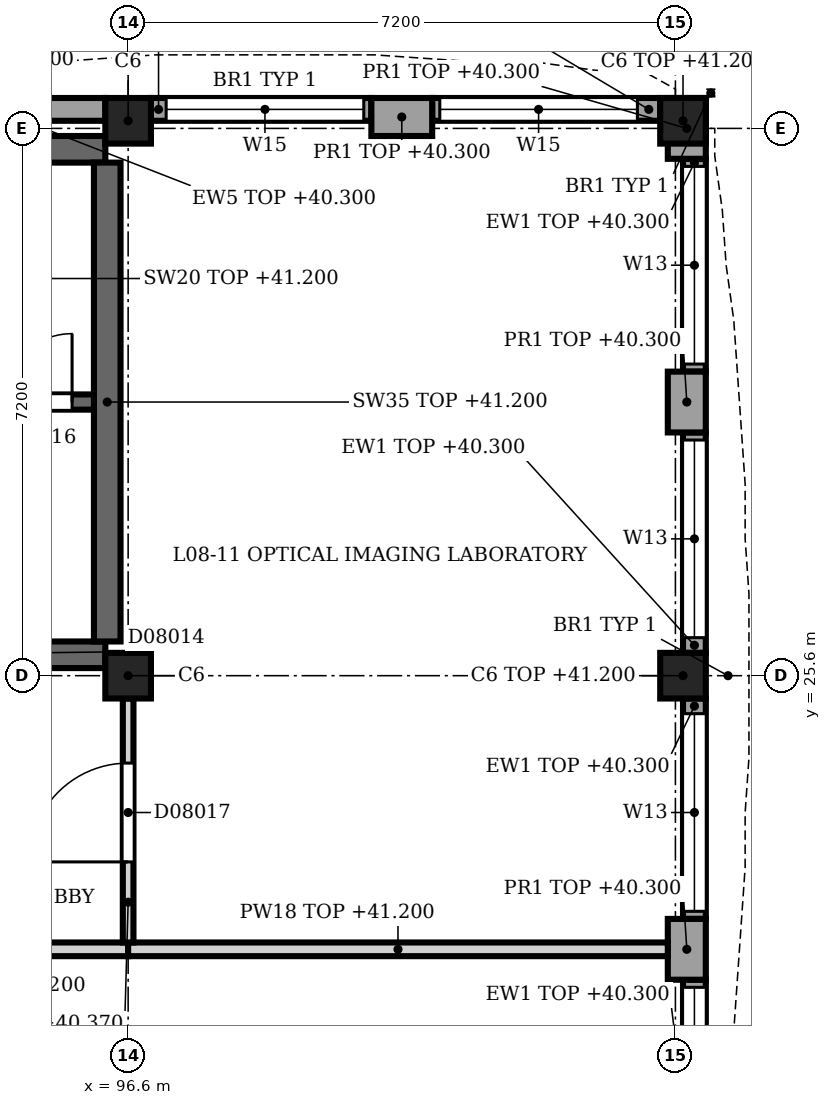
"""IFC4 building model, lengths in metres.
Left out: names, types, materials, properties, quantities, classifications, styles, units other than length and angle.
Written with IfcOpenShell. Run it as: python <this file> out.ifc"""

import sys

from ifc_helpers import new_model, si_unit, direction, frame, frame_2d, origin, origin_2d, place, context, subcontext, project, spatial, rectangle, extrude, element, fill, save


model = new_model("IFC4")
c1 = context("Model", 3, precision=1e-05, world=origin(), true_north=direction((0.0, 1.0)))
c2 = subcontext(c1, "Body", "Model", "MODEL_VIEW")
j1 = project(units=[si_unit("LENGTHUNIT", "METRE"), si_unit("PLANEANGLEUNIT", "RADIAN")], contexts=[c1])
p1 = place(None, origin())
s1 = spatial("IfcSite", under=j1, at=p1, CompositionType="ELEMENT")
p2 = place(p1, origin())
s2 = spatial("IfcBuilding", under=s1, at=p2, CompositionType="ELEMENT")
p3 = place(p2, frame((0.0, 0.0, 36.9)))
s3 = spatial("IfcBuildingStorey", under=s2, at=p3, CompositionType="ELEMENT", Elevation=36.9)
for number, where, z_axis, x_axis in (
    (1, (96.6, 25.6, 0.0), (0.0, 0.0, 1.0), (1.0, 0.0, 0.0)),
    (2, (96.6, 32.9, 0.0), (0.0, 0.0, 1.0), (1.0, 0.0, 0.0)),
):
    element("IfcColumn", number, at=place(p3, frame(where, z_axis=z_axis, x_axis=x_axis)), inside=s3, PredefinedType="COLUMN", context=c2, shape_type="SweptSolid", body=[
        extrude(rectangle(XDim=0.6, YDim=0.6, at=origin_2d()), origin(), (0.0, 0.0, 1.0), 4.5),
    ])
for number, where, z_axis, x_axis in (
    (3, (103.9, 25.6, 0.0), (0.0, 0.0, 1.0), (1.0, 0.0, 0.0)),
    (4, (103.9, 32.9, 0.0), (0.0, 0.0, 1.0), (1.0, 0.0, 0.0)),
):
    element("IfcColumn", number, at=place(p3, frame(where, z_axis=z_axis, x_axis=x_axis)), inside=s3, PredefinedType="COLUMN", context=c2, shape_type="SweptSolid", body=[
        extrude(rectangle(XDim=0.6, YDim=0.6, at=origin_2d()), origin(), (0.0, 0.0, 1.0), 4.3),
    ])
p4 = place(p3, frame((99.8, 32.95, 0.0), z_axis=(0.0, 0.0, 1.0), x_axis=(1.0, 0.0, 0.0)))
e5 = element("IfcWall", 5, at=p4, inside=s3, PredefinedType="SOLIDWALL", context=c2, shape_type="SweptSolid", body=[
    extrude(rectangle(XDim=0.8, YDim=0.5, at=frame_2d((0.4, 0.0))), origin(), (0.0, 0.0, 1.0), 3.4),
])
p5 = place(p3, frame((93.4, 33.05, 0.0), z_axis=(0.0, 0.0, 1.0), x_axis=(1.0, 0.0, 0.0)))
e6 = element("IfcWall", 6, at=p5, inside=s3, PredefinedType="SOLIDWALL", context=c2, shape_type="SweptSolid", body=[
    extrude(rectangle(XDim=2.9, YDim=0.3, at=frame_2d((1.45, 0.0))), origin(), (0.0, 0.0, 1.0), 3.4),
])
p6 = place(p3, frame((96.9, 33.05, 0.0), z_axis=(0.0, 0.0, 1.0), x_axis=(1.0, 0.0, 0.0)))
e7 = element("IfcWall", 7, at=p6, inside=s3, PredefinedType="SOLIDWALL", context=c2, shape_type="SweptSolid", body=[
    extrude(rectangle(XDim=2.9, YDim=0.3, at=frame_2d((1.45, 0.0))), origin(), (0.0, 0.0, 1.0), 3.4),
])
p7 = place(p6, frame((0.2, 0.0, 1.0)))
e8 = element("IfcOpeningElement", 8, at=p7, cuts=e7, PredefinedType="OPENING", context=c2, shape_type="SweptSolid", body=[
    extrude(rectangle(XDim=2.6, YDim=2.0, at=frame_2d((1.3, 1.0))), frame((0.0, 0.16, 0.0), z_axis=(0.0, -1.0, 0.0), x_axis=(1.0, 0.0, 0.0)), (0.0, 0.0, 1.0), 0.32),
])
p8 = place(p3, frame((100.6, 33.05, 0.0), z_axis=(0.0, 0.0, 1.0), x_axis=(1.0, 0.0, 0.0)))
e9 = element("IfcWall", 9, at=p8, inside=s3, PredefinedType="SOLIDWALL", context=c2, shape_type="SweptSolid", body=[
    extrude(rectangle(XDim=3.0, YDim=0.3, at=frame_2d((1.5, 0.0))), origin(), (0.0, 0.0, 1.0), 3.4),
])
p9 = place(p8, frame((0.1, 0.0, 1.0)))
e10 = element("IfcOpeningElement", 10, at=p9, cuts=e9, PredefinedType="OPENING", context=c2, shape_type="SweptSolid", body=[
    extrude(rectangle(XDim=2.6, YDim=2.0, at=frame_2d((1.3, 1.0))), frame((0.0, 0.16, 0.0), z_axis=(0.0, -1.0, 0.0), x_axis=(1.0, 0.0, 0.0)), (0.0, 0.0, 1.0), 0.32),
])
for number, where, z_axis, x_axis in (
    (11, (103.95, 33.2, 0.0), (0.0, 0.0, 1.0), (0.0, -1.0, 0.0)),
    (12, (103.95, 29.6, 0.0), (0.0, 0.0, 1.0), (0.0, -1.0, 0.0)),
):
    element("IfcWall", number, at=place(p3, frame(where, z_axis=z_axis, x_axis=x_axis)), inside=s3, PredefinedType="SOLIDWALL", context=c2, shape_type="SweptSolid", body=[
        extrude(rectangle(XDim=0.8, YDim=0.5, at=frame_2d((0.4, 0.0))), origin(), (0.0, 0.0, 1.0), 3.4),
    ])
p10 = place(p3, frame((103.95, 22.4, 0.0), z_axis=(0.0, 0.0, 1.0), x_axis=(0.0, -1.0, 0.0)))
e13 = element("IfcWall", 13, at=p10, inside=s3, PredefinedType="SOLIDWALL", context=c2, shape_type="SweptSolid", body=[
    extrude(rectangle(XDim=0.8, YDim=0.5, at=frame_2d((0.4, 0.0))), origin(), (0.0, 0.0, 1.0), 3.4),
])
p11 = place(p3, frame((104.05, 32.4, 0.0), z_axis=(0.0, 0.0, 1.0), x_axis=(0.0, -1.0, 0.0)))
e14 = element("IfcWall", 14, at=p11, inside=s3, PredefinedType="SOLIDWALL", context=c2, shape_type="SweptSolid", body=[
    extrude(rectangle(XDim=2.8, YDim=0.3, at=frame_2d((1.4, 0.0))), origin(), (0.0, 0.0, 1.0), 3.4),
])
p12 = place(p11, frame((0.1, 0.0, 0.9)))
e15 = element("IfcOpeningElement", 15, at=p12, cuts=e14, PredefinedType="OPENING", context=c2, shape_type="SweptSolid", body=[
    extrude(rectangle(XDim=2.6, YDim=2.2, at=frame_2d((1.3, 1.1))), frame((0.0, 0.16, 0.0), z_axis=(0.0, -1.0, 0.0), x_axis=(1.0, 0.0, 0.0)), (0.0, 0.0, 1.0), 0.32),
])
p13 = place(p3, frame((104.05, 28.8, 0.0), z_axis=(0.0, 0.0, 1.0), x_axis=(0.0, -1.0, 0.0)))
e16 = element("IfcWall", 16, at=p13, inside=s3, PredefinedType="SOLIDWALL", context=c2, shape_type="SweptSolid", body=[
    extrude(rectangle(XDim=2.9, YDim=0.3, at=frame_2d((1.45, 0.0))), origin(), (0.0, 0.0, 1.0), 3.4),
])
p14 = place(p13, frame((0.1, 0.0, 0.9)))
e17 = element("IfcOpeningElement", 17, at=p14, cuts=e16, PredefinedType="OPENING", context=c2, shape_type="SweptSolid", body=[
    extrude(rectangle(XDim=2.6, YDim=2.2, at=frame_2d((1.3, 1.1))), frame((0.0, 0.16, 0.0), z_axis=(0.0, -1.0, 0.0), x_axis=(1.0, 0.0, 0.0)), (0.0, 0.0, 1.0), 0.32),
])
p15 = place(p3, frame((104.05, 25.3, 0.0), z_axis=(0.0, 0.0, 1.0), x_axis=(0.0, -1.0, 0.0)))
e18 = element("IfcWall", 18, at=p15, inside=s3, PredefinedType="SOLIDWALL", context=c2, shape_type="SweptSolid", body=[
    extrude(rectangle(XDim=2.9, YDim=0.3, at=frame_2d((1.45, 0.0))), origin(), (0.0, 0.0, 1.0), 3.4),
])
p16 = place(p15, frame((0.2, 0.0, 0.9)))
e19 = element("IfcOpeningElement", 19, at=p16, cuts=e18, PredefinedType="OPENING", context=c2, shape_type="SweptSolid", body=[
    extrude(rectangle(XDim=2.6, YDim=2.2, at=frame_2d((1.3, 1.1))), frame((0.0, 0.16, 0.0), z_axis=(0.0, -1.0, 0.0), x_axis=(1.0, 0.0, 0.0)), (0.0, 0.0, 1.0), 0.32),
])
p17 = place(p3, frame((104.05, 21.6, 0.0), z_axis=(0.0, 0.0, 1.0), x_axis=(0.0, -1.0, 0.0)))
e20 = element("IfcWall", 20, at=p17, inside=s3, PredefinedType="SOLIDWALL", context=c2, shape_type="SweptSolid", body=[
    extrude(rectangle(XDim=2.9, YDim=0.3, at=frame_2d((1.45, 0.0))), origin(), (0.0, 0.0, 1.0), 3.4),
])
p18 = place(p17, frame((0.1, 0.0, 0.9)))
e21 = element("IfcOpeningElement", 21, at=p18, cuts=e20, PredefinedType="OPENING", context=c2, shape_type="SweptSolid", body=[
    extrude(rectangle(XDim=2.6, YDim=2.2, at=frame_2d((1.3, 1.1))), frame((0.0, 0.16, 0.0), z_axis=(0.0, -1.0, 0.0), x_axis=(1.0, 0.0, 0.0)), (0.0, 0.0, 1.0), 0.32),
])
p19 = place(p3, frame((89.7, 25.875, 0.0), z_axis=(0.0, 0.0, 1.0), x_axis=(1.0, 0.0, 0.0)))
e22 = element("IfcWall", 22, at=p19, inside=s3, PredefinedType="SHEAR", context=c2, shape_type="SweptSolid", body=[
    extrude(rectangle(XDim=6.6, YDim=0.35, at=frame_2d((3.3, 0.0))), origin(), (0.0, 0.0, 1.0), 4.3),
])
p20 = place(p19, frame((2.7, 0.0, 0.0)))
e23 = element("IfcOpeningElement", 23, at=p20, cuts=e22, PredefinedType="OPENING", context=c2, shape_type="SweptSolid", body=[
    extrude(rectangle(XDim=1.8, YDim=2.1, at=frame_2d((0.9, 1.05))), frame((0.0, 0.185, 0.0), z_axis=(0.0, -1.0, 0.0), x_axis=(1.0, 0.0, 0.0)), (0.0, 0.0, 1.0), 0.37),
])
p21 = place(p3, frame((89.7, 32.525, 0.0), z_axis=(0.0, 0.0, 1.0), x_axis=(1.0, 0.0, 0.0)))
e24 = element("IfcWall", 24, at=p21, inside=s3, PredefinedType="SHEAR", context=c2, shape_type="SweptSolid", body=[
    extrude(rectangle(XDim=6.6, YDim=0.35, at=frame_2d((3.3, 0.0))), origin(), (0.0, 0.0, 1.0), 4.3),
])
p22 = place(p3, frame((96.325, 26.05, 0.0), z_axis=(0.0, 0.0, 1.0), x_axis=(0.0, 1.0, 0.0)))
e25 = element("IfcWall", 25, at=p22, inside=s3, PredefinedType="SHEAR", context=c2, shape_type="SweptSolid", body=[
    extrude(rectangle(XDim=6.3, YDim=0.35, at=frame_2d((3.15, 0.0))), origin(), (0.0, 0.0, 1.0), 4.3),
])
p23 = place(p3, frame((96.15, 29.2, 0.0), z_axis=(0.0, 0.0, 1.0), x_axis=(-1.0, 0.0, 0.0)))
e26 = element("IfcWall", 26, at=p23, inside=s3, PredefinedType="SHEAR", context=c2, shape_type="SweptSolid", body=[
    extrude(rectangle(XDim=10.35, YDim=0.2, at=frame_2d((5.175, 0.0))), origin(), (0.0, 0.0, 1.0), 4.3),
])
p24 = place(p23, frame((8.8, 0.0, 0.0)))
e27 = element("IfcOpeningElement", 27, at=p24, cuts=e26, PredefinedType="OPENING", context=c2, shape_type="SweptSolid", body=[
    extrude(rectangle(XDim=1.1, YDim=2.1, at=frame_2d((0.55, 1.05))), frame((0.0, 0.11, 0.0), z_axis=(0.0, -1.0, 0.0), x_axis=(1.0, 0.0, 0.0)), (0.0, 0.0, 1.0), 0.22),
])
p25 = place(p23, frame((6.6, 0.0, 0.0)))
e28 = element("IfcOpeningElement", 28, at=p25, cuts=e26, PredefinedType="OPENING", context=c2, shape_type="SweptSolid", body=[
    extrude(rectangle(XDim=1.1, YDim=2.1, at=frame_2d((0.55, 1.05))), frame((0.0, 0.11, 0.0), z_axis=(0.0, -1.0, 0.0), x_axis=(1.0, 0.0, 0.0)), (0.0, 0.0, 1.0), 0.22),
])
p26 = place(p23, frame((3.75, 0.0, 0.0)))
e29 = element("IfcOpeningElement", 29, at=p26, cuts=e26, PredefinedType="OPENING", context=c2, shape_type="SweptSolid", body=[
    extrude(rectangle(XDim=1.4, YDim=2.1, at=frame_2d((0.7, 1.05))), frame((0.0, 0.11, 0.0), z_axis=(0.0, -1.0, 0.0), x_axis=(1.0, 0.0, 0.0)), (0.0, 0.0, 1.0), 0.22),
])
p27 = place(p23, frame((1.962, 0.0, 0.0)))
e30 = element("IfcOpeningElement", 30, at=p27, cuts=e26, PredefinedType="OPENING", context=c2, shape_type="SweptSolid", body=[
    extrude(rectangle(XDim=0.9, YDim=2.1, at=frame_2d((0.45, 1.05))), frame((0.0, 0.11, 0.0), z_axis=(0.0, -1.0, 0.0), x_axis=(1.0, 0.0, 0.0)), (0.0, 0.0, 1.0), 0.22),
])
p28 = place(p23, frame((0.288, 0.0, 0.0)))
e31 = element("IfcOpeningElement", 31, at=p28, cuts=e26, PredefinedType="OPENING", context=c2, shape_type="SweptSolid", body=[
    extrude(rectangle(XDim=0.9, YDim=2.1, at=frame_2d((0.45, 1.05))), frame((0.0, 0.11, 0.0), z_axis=(0.0, -1.0, 0.0), x_axis=(1.0, 0.0, 0.0)), (0.0, 0.0, 1.0), 0.22),
])
p29 = place(p3, frame((92.91, 22.0, 0.0), z_axis=(0.0, 0.0, 1.0), x_axis=(1.0, 0.0, 0.0)))
e32 = element("IfcWall", 32, at=p29, inside=s3, PredefinedType="PARTITIONING", context=c2, shape_type="SweptSolid", body=[
    extrude(rectangle(XDim=3.69, YDim=0.18, at=frame_2d((1.845, 0.0))), origin(), (0.0, 0.0, 1.0), 4.3),
])
p30 = place(p3, frame((96.6, 22.0, 0.0), z_axis=(0.0, 0.0, 1.0), x_axis=(1.0, 0.0, 0.0)))
e33 = element("IfcWall", 33, at=p30, inside=s3, PredefinedType="PARTITIONING", context=c2, shape_type="SweptSolid", body=[
    extrude(rectangle(XDim=7.1, YDim=0.18, at=frame_2d((3.55, 0.0))), origin(), (0.0, 0.0, 1.0), 4.3),
])
p31 = place(p3, frame((96.6, 25.3, 0.0), z_axis=(0.0, 0.0, 1.0), x_axis=(0.0, -1.0, 0.0)))
e34 = element("IfcWall", 34, at=p31, inside=s3, PredefinedType="PARTITIONING", context=c2, shape_type="SweptSolid", body=[
    extrude(rectangle(XDim=3.21, YDim=0.14, at=frame_2d((1.605, 0.0))), origin(), (0.0, 0.0, 1.0), 3.47),
])
p32 = place(p31, frame((0.85, 0.0, 0.0)))
e35 = element("IfcOpeningElement", 35, at=p32, cuts=e34, PredefinedType="OPENING", context=c2, shape_type="SweptSolid", body=[
    extrude(rectangle(XDim=1.3, YDim=2.1, at=frame_2d((0.65, 1.05))), frame((0.0, 0.08, 0.0), z_axis=(0.0, -1.0, 0.0), x_axis=(1.0, 0.0, 0.0)), (0.0, 0.0, 1.0), 0.16),
])
p33 = place(p7, origin())
e36 = element("IfcWindow", 36, at=p33, inside=s3, PartitioningType="SINGLE_PANEL", PredefinedType="WINDOW", context=c2, shape_type="SweptSolid", body=[
    extrude(rectangle(XDim=2.6, YDim=2.0, at=frame_2d((1.3, 1.0))), frame((0.0, 0.03, 0.0), z_axis=(0.0, -1.0, 0.0), x_axis=(1.0, 0.0, 0.0)), (0.0, 0.0, 1.0), 0.06),
])
fill(e8, e36)
p34 = place(p9, origin())
e37 = element("IfcWindow", 37, at=p34, inside=s3, PartitioningType="SINGLE_PANEL", PredefinedType="WINDOW", context=c2, shape_type="SweptSolid", body=[
    extrude(rectangle(XDim=2.6, YDim=2.0, at=frame_2d((1.3, 1.0))), frame((0.0, 0.03, 0.0), z_axis=(0.0, -1.0, 0.0), x_axis=(1.0, 0.0, 0.0)), (0.0, 0.0, 1.0), 0.06),
])
fill(e10, e37)
p35 = place(p12, origin())
e38 = element("IfcWindow", 38, at=p35, inside=s3, PartitioningType="SINGLE_PANEL", PredefinedType="WINDOW", context=c2, shape_type="SweptSolid", body=[
    extrude(rectangle(XDim=2.6, YDim=2.2, at=frame_2d((1.3, 1.1))), frame((0.0, 0.03, 0.0), z_axis=(0.0, -1.0, 0.0), x_axis=(1.0, 0.0, 0.0)), (0.0, 0.0, 1.0), 0.06),
])
fill(e15, e38)
p36 = place(p14, origin())
e39 = element("IfcWindow", 39, at=p36, inside=s3, PartitioningType="SINGLE_PANEL", PredefinedType="WINDOW", context=c2, shape_type="SweptSolid", body=[
    extrude(rectangle(XDim=2.6, YDim=2.2, at=frame_2d((1.3, 1.1))), frame((0.0, 0.03, 0.0), z_axis=(0.0, -1.0, 0.0), x_axis=(1.0, 0.0, 0.0)), (0.0, 0.0, 1.0), 0.06),
])
fill(e17, e39)
p37 = place(p16, origin())
e40 = element("IfcWindow", 40, at=p37, inside=s3, PartitioningType="SINGLE_PANEL", PredefinedType="WINDOW", context=c2, shape_type="SweptSolid", body=[
    extrude(rectangle(XDim=2.6, YDim=2.2, at=frame_2d((1.3, 1.1))), frame((0.0, 0.03, 0.0), z_axis=(0.0, -1.0, 0.0), x_axis=(1.0, 0.0, 0.0)), (0.0, 0.0, 1.0), 0.06),
])
fill(e19, e40)
p38 = place(p18, origin())
e41 = element("IfcWindow", 41, at=p38, inside=s3, PartitioningType="SINGLE_PANEL", PredefinedType="WINDOW", context=c2, shape_type="SweptSolid", body=[
    extrude(rectangle(XDim=2.6, YDim=2.2, at=frame_2d((1.3, 1.1))), frame((0.0, 0.03, 0.0), z_axis=(0.0, -1.0, 0.0), x_axis=(1.0, 0.0, 0.0)), (0.0, 0.0, 1.0), 0.06),
])
fill(e21, e41)
p39 = place(p28, origin())
e42 = element("IfcDoor", 42, at=p39, inside=s3, OperationType="SINGLE_SWING_LEFT", PredefinedType="DOOR", context=c2, shape_type="SweptSolid", body=[
    extrude(rectangle(XDim=0.9, YDim=2.1, at=frame_2d((0.45, 1.05))), frame((0.0, 0.025, 0.0), z_axis=(0.0, -1.0, 0.0), x_axis=(1.0, 0.0, 0.0)), (0.0, 0.0, 1.0), 0.05),
])
fill(e31, e42)
p40 = place(p32, origin())
e43 = element("IfcDoor", 43, at=p40, inside=s3, OperationType="SINGLE_SWING_LEFT", PredefinedType="DOOR", context=c2, shape_type="SweptSolid", body=[
    extrude(rectangle(XDim=1.3, YDim=2.1, at=frame_2d((0.65, 1.05))), frame((0.0, 0.025, 0.0), z_axis=(0.0, -1.0, 0.0), x_axis=(1.0, 0.0, 0.0)), (0.0, 0.0, 1.0), 0.05),
])
fill(e35, e43)
save(model, sys.argv[1])
